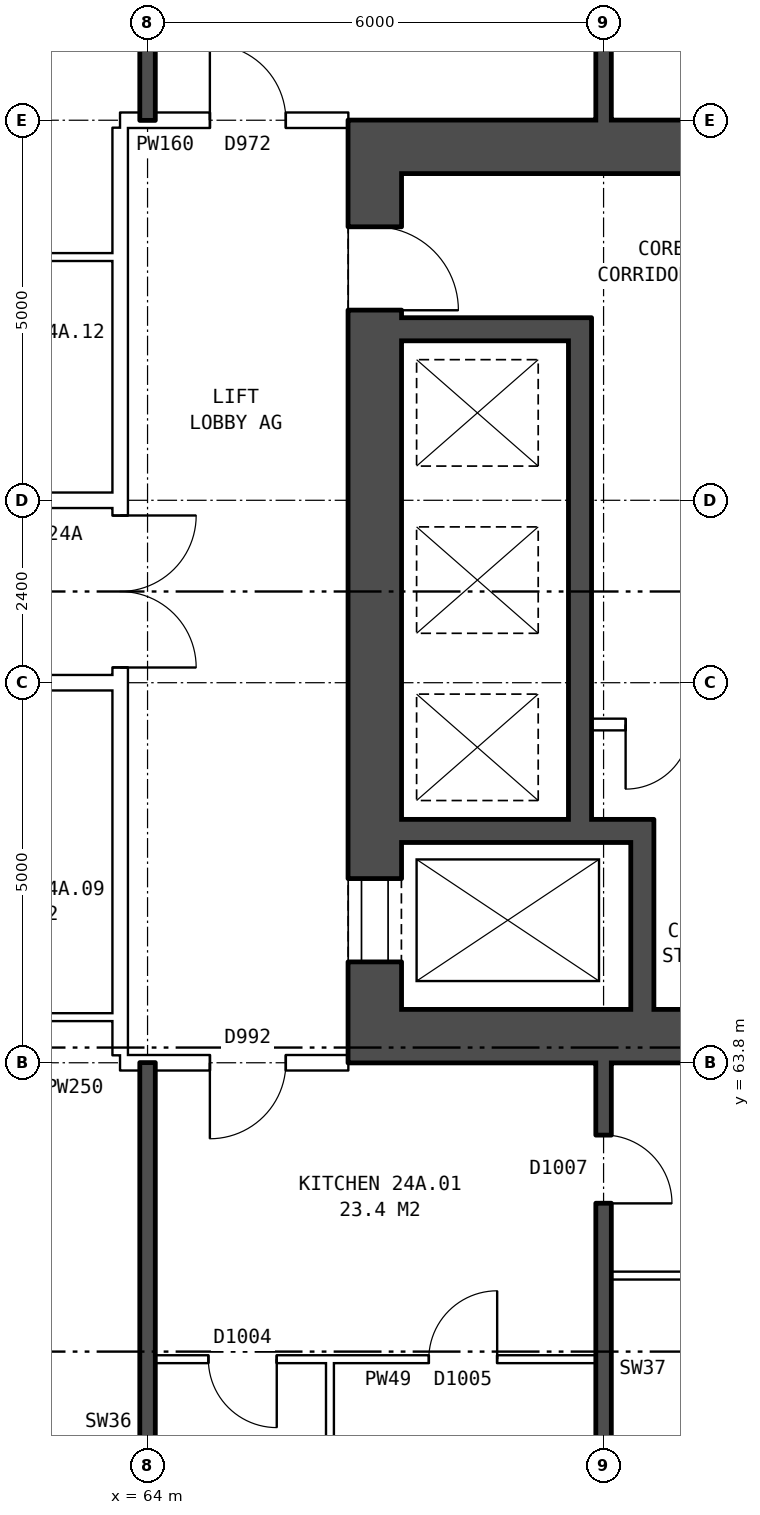
"""IFC4 building model, lengths in metres.
Left out: names, types, materials, properties, quantities, classifications, styles, units other than length and angle.
Written with IfcOpenShell. Run it as: python <this file> out.ifc"""

import sys

from ifc_helpers import new_model, si_unit, direction, frame, frame_2d, origin, place, context, subcontext, project, spatial, rectangle, extrude, element, fill, save


model = new_model("IFC4")
c1 = context("Model", 3, precision=1e-05, world=origin(), true_north=direction((0.0, 1.0)))
c2 = subcontext(c1, "Body", "Model", "MODEL_VIEW")
j1 = project(units=[si_unit("LENGTHUNIT", "METRE"), si_unit("PLANEANGLEUNIT", "RADIAN")], contexts=[c1])
p1 = place(None, origin())
s1 = spatial("IfcSite", under=j1, at=p1, CompositionType="ELEMENT")
p2 = place(p1, origin())
s2 = spatial("IfcBuilding", under=s1, at=p2, CompositionType="ELEMENT")
p3 = place(p2, frame((0.0, 0.0, 87.1)))
s3 = spatial("IfcBuildingStorey", under=s2, at=p3, CompositionType="ELEMENT", Elevation=87.1)
p4 = place(p3, frame((66.99, 64.5, 0.0), z_axis=(0.0, 0.0, 1.0), x_axis=(0.0, 1.0, 0.0)))
e1 = element("IfcWall", 1, at=p4, inside=s3, PredefinedType="SHEAR", context=c2, shape_type="SweptSolid", body=[
    extrude(rectangle(XDim=11.0, YDim=0.7, at=frame_2d((5.5, 0.0))), origin(), (0.0, 0.0, 1.0), 2.85),
])
p5 = place(p4, frame((0.625, 0.0, 0.0)))
e2 = element("IfcOpeningElement", 2, at=p5, cuts=e1, PredefinedType="OPENING", context=c2, shape_type="SweptSolid", body=[
    extrude(rectangle(XDim=1.1, YDim=2.1, at=frame_2d((0.55, 1.05))), frame((0.0, 0.36, 0.0), z_axis=(0.0, -1.0, 0.0), x_axis=(1.0, 0.0, 0.0)), (0.0, 0.0, 1.0), 0.72),
])
p6 = place(p4, frame((9.2, 0.0, 0.0)))
e3 = element("IfcOpeningElement", 3, at=p6, cuts=e1, PredefinedType="OPENING", context=c2, shape_type="SweptSolid", body=[
    extrude(rectangle(XDim=1.1, YDim=2.1, at=frame_2d((0.55, 1.05))), frame((0.0, 0.36, 0.0), z_axis=(0.0, -1.0, 0.0), x_axis=(1.0, 0.0, 0.0)), (0.0, 0.0, 1.0), 0.72),
])
for number, where, z_axis, x_axis in (
    (4, (66.64, 64.15, 0.0), (0.0, 0.0, 1.0), (1.0, 0.0, 0.0)),
    (5, (66.64, 75.85, 0.0), (0.0, 0.0, 1.0), (1.0, 0.0, 0.0)),
):
    element("IfcWall", number, at=place(p3, frame(where, z_axis=z_axis, x_axis=x_axis)), inside=s3, PredefinedType="SHEAR", context=c2, shape_type="SweptSolid", body=[
        extrude(rectangle(XDim=9.0, YDim=0.7, at=frame_2d((4.5, 0.0))), origin(), (0.0, 0.0, 1.0), 2.85),
    ])
p7 = place(p3, frame((67.34, 66.85, 0.0), z_axis=(0.0, 0.0, 1.0), x_axis=(1.0, 0.0, 0.0)))
e6 = element("IfcWall", 6, at=p7, inside=s3, PredefinedType="SHEAR", context=c2, shape_type="SweptSolid", body=[
    extrude(rectangle(XDim=3.32, YDim=0.3, at=frame_2d((1.66, 0.0))), origin(), (0.0, 0.0, 1.0), 2.85),
])
p8 = place(p3, frame((69.84, 68.25, 0.0), z_axis=(0.0, 0.0, 1.0), x_axis=(1.0, 0.0, 0.0)))
e7 = element("IfcWall", 7, at=p8, inside=s3, PredefinedType="PARTITIONING", context=c2, shape_type="SweptSolid", body=[
    extrude(rectangle(XDim=1.75, YDim=0.15, at=frame_2d((0.875, 0.0))), origin(), (0.0, 0.0, 1.0), 2.85),
])
p9 = place(p8, frame((0.45, 0.0, 0.0)))
e8 = element("IfcOpeningElement", 8, at=p9, cuts=e7, PredefinedType="OPENING", context=c2, shape_type="SweptSolid", body=[
    extrude(rectangle(XDim=0.85, YDim=2.1, at=frame_2d((0.425, 1.05))), frame((0.0, 0.085, 0.0), z_axis=(0.0, -1.0, 0.0), x_axis=(1.0, 0.0, 0.0)), (0.0, 0.0, 1.0), 0.17),
])
p10 = place(p3, frame((67.34, 73.45, 0.0), z_axis=(0.0, 0.0, 1.0), x_axis=(1.0, 0.0, 0.0)))
e9 = element("IfcWall", 9, at=p10, inside=s3, PredefinedType="SHEAR", context=c2, shape_type="SweptSolid", body=[
    extrude(rectangle(XDim=2.2, YDim=0.3, at=frame_2d((1.1, 0.0))), origin(), (0.0, 0.0, 1.0), 2.85),
])
p11 = place(p3, frame((69.69, 67.0, 0.0), z_axis=(0.0, 0.0, 1.0), x_axis=(0.0, 1.0, 0.0)))
e10 = element("IfcWall", 10, at=p11, inside=s3, PredefinedType="SHEAR", context=c2, shape_type="SweptSolid", body=[
    extrude(rectangle(XDim=6.6, YDim=0.3, at=frame_2d((3.3, 0.0))), origin(), (0.0, 0.0, 1.0), 2.85),
])
p12 = place(p3, frame((70.51, 64.5, 0.0), z_axis=(0.0, 0.0, 1.0), x_axis=(0.0, 1.0, 0.0)))
e11 = element("IfcWall", 11, at=p12, inside=s3, PredefinedType="SHEAR", context=c2, shape_type="SweptSolid", body=[
    extrude(rectangle(XDim=2.2, YDim=0.3, at=frame_2d((1.1, 0.0))), origin(), (0.0, 0.0, 1.0), 2.85),
])
p13 = place(p3, frame((63.64, 63.9, 0.0), z_axis=(0.0, 0.0, 1.0), x_axis=(0.0, 1.0, 0.0)))
e12 = element("IfcWall", 12, at=p13, inside=s3, PredefinedType="PARTITIONING", context=c2, shape_type="SweptSolid", body=[
    extrude(rectangle(XDim=12.2, YDim=0.2, at=frame_2d((6.1, 0.0))), origin(), (0.0, 0.0, 1.0), 2.85),
])
p14 = place(p13, frame((5.1, 0.0, 0.0)))
e13 = element("IfcOpeningElement", 13, at=p14, cuts=e12, PredefinedType="OPENING", context=c2, shape_type="SweptSolid", body=[
    extrude(rectangle(XDim=2.0, YDim=2.1, at=frame_2d((1.0, 1.05))), frame((0.0, 0.11, 0.0), z_axis=(0.0, -1.0, 0.0), x_axis=(1.0, 0.0, 0.0)), (0.0, 0.0, 1.0), 0.22),
])
p15 = place(p3, frame((64.1, 59.9, 0.0), z_axis=(0.0, 0.0, 1.0), x_axis=(1.0, 0.0, 0.0)))
e14 = element("IfcWall", 14, at=p15, inside=s3, PredefinedType="PARTITIONING", context=c2, shape_type="SweptSolid", body=[
    extrude(rectangle(XDim=5.8, YDim=0.1, at=frame_2d((2.9, 0.0))), origin(), (0.0, 0.0, 1.0), 2.85),
])
p16 = place(p15, frame((3.6, 0.0, 0.0)))
e15 = element("IfcOpeningElement", 15, at=p16, cuts=e14, PredefinedType="OPENING", context=c2, shape_type="SweptSolid", body=[
    extrude(rectangle(XDim=0.9, YDim=2.1, at=frame_2d((0.45, 1.05))), frame((0.0, 0.06, 0.0), z_axis=(0.0, -1.0, 0.0), x_axis=(1.0, 0.0, 0.0)), (0.0, 0.0, 1.0), 0.12),
])
p17 = place(p15, frame((0.7, 0.0, 0.0)))
e16 = element("IfcOpeningElement", 16, at=p17, cuts=e14, PredefinedType="OPENING", context=c2, shape_type="SweptSolid", body=[
    extrude(rectangle(XDim=0.9, YDim=2.1, at=frame_2d((0.45, 1.05))), frame((0.0, 0.06, 0.0), z_axis=(0.0, -1.0, 0.0), x_axis=(1.0, 0.0, 0.0)), (0.0, 0.0, 1.0), 0.12),
])
p18 = place(p3, frame((70.1, 61.0, 0.0), z_axis=(0.0, 0.0, 1.0), x_axis=(1.0, 0.0, 0.0)))
e17 = element("IfcWall", 17, at=p18, inside=s3, PredefinedType="PARTITIONING", context=c2, shape_type="SweptSolid", body=[
    extrude(rectangle(XDim=5.54, YDim=0.1, at=frame_2d((2.77, 0.0))), origin(), (0.0, 0.0, 1.0), 2.85),
])
p19 = place(p3, frame((63.64, 63.8, 0.0), z_axis=(0.0, 0.0, 1.0), x_axis=(1.0, 0.0, 0.0)))
e18 = element("IfcWall", 18, at=p19, inside=s3, PredefinedType="PARTITIONING", context=c2, shape_type="SweptSolid", body=[
    extrude(rectangle(XDim=3.0, YDim=0.2, at=frame_2d((1.5, 0.0))), origin(), (0.0, 0.0, 1.0), 2.85),
])
p20 = place(p19, frame((1.18, 0.0, 0.0)))
e19 = element("IfcOpeningElement", 19, at=p20, cuts=e18, PredefinedType="OPENING", context=c2, shape_type="SweptSolid", body=[
    extrude(rectangle(XDim=1.0, YDim=2.1, at=frame_2d((0.5, 1.05))), frame((0.0, 0.11, 0.0), z_axis=(0.0, -1.0, 0.0), x_axis=(1.0, 0.0, 0.0)), (0.0, 0.0, 1.0), 0.22),
])
p21 = place(p3, frame((61.0, 64.4, 0.0), z_axis=(0.0, 0.0, 1.0), x_axis=(1.0, 0.0, 0.0)))
e20 = element("IfcWall", 20, at=p21, inside=s3, PredefinedType="PARTITIONING", context=c2, shape_type="SweptSolid", body=[
    extrude(rectangle(XDim=2.64, YDim=0.1, at=frame_2d((1.32, 0.0))), origin(), (0.0, 0.0, 1.0), 2.85),
])
p22 = place(p3, frame((44.36, 68.8, 0.0), z_axis=(0.0, 0.0, 1.0), x_axis=(1.0, 0.0, 0.0)))
e21 = element("IfcWall", 21, at=p22, inside=s3, PredefinedType="PARTITIONING", context=c2, shape_type="SweptSolid", body=[
    extrude(rectangle(XDim=19.28, YDim=0.2, at=frame_2d((9.64, 0.0))), origin(), (0.0, 0.0, 1.0), 2.85),
])
p23 = place(p22, frame((14.64, 0.0, 0.0)))
e22 = element("IfcOpeningElement", 22, at=p23, cuts=e21, PredefinedType="OPENING", context=c2, shape_type="SweptSolid", body=[
    extrude(rectangle(XDim=1.0, YDim=2.1, at=frame_2d((0.5, 1.05))), frame((0.0, 0.11, 0.0), z_axis=(0.0, -1.0, 0.0), x_axis=(1.0, 0.0, 0.0)), (0.0, 0.0, 1.0), 0.22),
])
p24 = place(p22, frame((11.64, 0.0, 0.0)))
e23 = element("IfcOpeningElement", 23, at=p24, cuts=e21, PredefinedType="OPENING", context=c2, shape_type="SweptSolid", body=[
    extrude(rectangle(XDim=1.0, YDim=2.1, at=frame_2d((0.5, 1.05))), frame((0.0, 0.11, 0.0), z_axis=(0.0, -1.0, 0.0), x_axis=(1.0, 0.0, 0.0)), (0.0, 0.0, 1.0), 0.22),
])
p25 = place(p22, frame((2.64, 0.0, 0.0)))
e24 = element("IfcOpeningElement", 24, at=p25, cuts=e21, PredefinedType="OPENING", context=c2, shape_type="SweptSolid", body=[
    extrude(rectangle(XDim=1.0, YDim=2.1, at=frame_2d((0.5, 1.05))), frame((0.0, 0.11, 0.0), z_axis=(0.0, -1.0, 0.0), x_axis=(1.0, 0.0, 0.0)), (0.0, 0.0, 1.0), 0.22),
])
p26 = place(p3, frame((44.36, 71.2, 0.0), z_axis=(0.0, 0.0, 1.0), x_axis=(1.0, 0.0, 0.0)))
e25 = element("IfcWall", 25, at=p26, inside=s3, PredefinedType="PARTITIONING", context=c2, shape_type="SweptSolid", body=[
    extrude(rectangle(XDim=19.28, YDim=0.2, at=frame_2d((9.64, 0.0))), origin(), (0.0, 0.0, 1.0), 2.85),
])
p27 = place(p26, frame((14.64, 0.0, 0.0)))
e26 = element("IfcOpeningElement", 26, at=p27, cuts=e25, PredefinedType="OPENING", context=c2, shape_type="SweptSolid", body=[
    extrude(rectangle(XDim=1.0, YDim=2.1, at=frame_2d((0.5, 1.05))), frame((0.0, 0.11, 0.0), z_axis=(0.0, -1.0, 0.0), x_axis=(1.0, 0.0, 0.0)), (0.0, 0.0, 1.0), 0.22),
])
p28 = place(p26, frame((8.64, 0.0, 0.0)))
e27 = element("IfcOpeningElement", 27, at=p28, cuts=e25, PredefinedType="OPENING", context=c2, shape_type="SweptSolid", body=[
    extrude(rectangle(XDim=1.0, YDim=2.1, at=frame_2d((0.5, 1.05))), frame((0.0, 0.11, 0.0), z_axis=(0.0, -1.0, 0.0), x_axis=(1.0, 0.0, 0.0)), (0.0, 0.0, 1.0), 0.22),
])
p29 = place(p26, frame((2.64, 0.0, 0.0)))
e28 = element("IfcOpeningElement", 28, at=p29, cuts=e25, PredefinedType="OPENING", context=c2, shape_type="SweptSolid", body=[
    extrude(rectangle(XDim=1.0, YDim=2.1, at=frame_2d((0.5, 1.05))), frame((0.0, 0.11, 0.0), z_axis=(0.0, -1.0, 0.0), x_axis=(1.0, 0.0, 0.0)), (0.0, 0.0, 1.0), 0.22),
])
p30 = place(p3, frame((61.0, 74.4, 0.0), z_axis=(0.0, 0.0, 1.0), x_axis=(1.0, 0.0, 0.0)))
e29 = element("IfcWall", 29, at=p30, inside=s3, PredefinedType="PARTITIONING", context=c2, shape_type="SweptSolid", body=[
    extrude(rectangle(XDim=2.64, YDim=0.1, at=frame_2d((1.32, 0.0))), origin(), (0.0, 0.0, 1.0), 2.85),
])
p31 = place(p3, frame((63.64, 76.2, 0.0), z_axis=(0.0, 0.0, 1.0), x_axis=(1.0, 0.0, 0.0)))
e30 = element("IfcWall", 30, at=p31, inside=s3, PredefinedType="PARTITIONING", context=c2, shape_type="SweptSolid", body=[
    extrude(rectangle(XDim=3.0, YDim=0.2, at=frame_2d((1.5, 0.0))), origin(), (0.0, 0.0, 1.0), 2.85),
])
p32 = place(p31, frame((1.18, 0.0, 0.0)))
e31 = element("IfcOpeningElement", 31, at=p32, cuts=e30, PredefinedType="OPENING", context=c2, shape_type="SweptSolid", body=[
    extrude(rectangle(XDim=1.0, YDim=2.1, at=frame_2d((0.5, 1.05))), frame((0.0, 0.11, 0.0), z_axis=(0.0, -1.0, 0.0), x_axis=(1.0, 0.0, 0.0)), (0.0, 0.0, 1.0), 0.22),
])
for number, where, z_axis, x_axis in (
    (32, (64.0, 54.36, 0.0), (0.0, 0.0, 1.0), (0.0, 1.0, 0.0)),
    (33, (64.0, 76.2, 0.0), (0.0, 0.0, 1.0), (0.0, 1.0, 0.0)),
):
    element("IfcWall", number, at=place(p3, frame(where, z_axis=z_axis, x_axis=x_axis)), inside=s3, PredefinedType="SOLIDWALL", context=c2, shape_type="SweptSolid", body=[
        extrude(rectangle(XDim=9.44, YDim=0.2, at=frame_2d((4.72, 0.0))), origin(), (0.0, 0.0, 1.0), 2.85),
    ])
p33 = place(p3, frame((66.4, 57.45, 0.0), z_axis=(0.0, 0.0, 1.0), x_axis=(0.0, 1.0, 0.0)))
e34 = element("IfcWall", 34, at=p33, inside=s3, PredefinedType="PARTITIONING", context=c2, shape_type="SweptSolid", body=[
    extrude(rectangle(XDim=2.4, YDim=0.1, at=frame_2d((1.2, 0.0))), origin(), (0.0, 0.0, 1.0), 2.85),
])
p34 = place(p3, frame((70.0, 54.36, 0.0), z_axis=(0.0, 0.0, 1.0), x_axis=(0.0, 1.0, 0.0)))
e35 = element("IfcWall", 35, at=p34, inside=s3, PredefinedType="SOLIDWALL", context=c2, shape_type="SweptSolid", body=[
    extrude(rectangle(XDim=9.44, YDim=0.2, at=frame_2d((4.72, 0.0))), origin(), (0.0, 0.0, 1.0), 2.85),
])
p35 = place(p34, frame((2.32, 0.0, 0.0)))
e36 = element("IfcOpeningElement", 36, at=p35, cuts=e35, PredefinedType="OPENING", context=c2, shape_type="SweptSolid", body=[
    extrude(rectangle(XDim=0.9, YDim=2.1, at=frame_2d((0.45, 1.05))), frame((0.0, 0.11, 0.0), z_axis=(0.0, -1.0, 0.0), x_axis=(1.0, 0.0, 0.0)), (0.0, 0.0, 1.0), 0.22),
])
p36 = place(p34, frame((7.59, 0.0, 0.0)))
e37 = element("IfcOpeningElement", 37, at=p36, cuts=e35, PredefinedType="OPENING", context=c2, shape_type="SweptSolid", body=[
    extrude(rectangle(XDim=0.9, YDim=2.1, at=frame_2d((0.45, 1.05))), frame((0.0, 0.11, 0.0), z_axis=(0.0, -1.0, 0.0), x_axis=(1.0, 0.0, 0.0)), (0.0, 0.0, 1.0), 0.22),
])
p37 = place(p3, frame((70.0, 76.2, 0.0), z_axis=(0.0, 0.0, 1.0), x_axis=(0.0, 1.0, 0.0)))
e38 = element("IfcWall", 38, at=p37, inside=s3, PredefinedType="SOLIDWALL", context=c2, shape_type="SweptSolid", body=[
    extrude(rectangle(XDim=9.44, YDim=0.2, at=frame_2d((4.72, 0.0))), origin(), (0.0, 0.0, 1.0), 2.85),
])
p38 = place(p37, frame((6.07, 0.0, 0.0)))
e39 = element("IfcOpeningElement", 39, at=p38, cuts=e38, PredefinedType="OPENING", context=c2, shape_type="SweptSolid", body=[
    extrude(rectangle(XDim=0.9, YDim=2.1, at=frame_2d((0.45, 1.05))), frame((0.0, 0.11, 0.0), z_axis=(0.0, -1.0, 0.0), x_axis=(1.0, 0.0, 0.0)), (0.0, 0.0, 1.0), 0.22),
])
p39 = place(p37, frame((0.95, 0.0, 0.0)))
e40 = element("IfcOpeningElement", 40, at=p39, cuts=e38, PredefinedType="OPENING", context=c2, shape_type="SweptSolid", body=[
    extrude(rectangle(XDim=0.9, YDim=2.1, at=frame_2d((0.45, 1.05))), frame((0.0, 0.11, 0.0), z_axis=(0.0, -1.0, 0.0), x_axis=(1.0, 0.0, 0.0)), (0.0, 0.0, 1.0), 0.22),
])
p40 = place(p5, origin())
e41 = element("IfcDoor", 41, at=p40, inside=s3, OperationType="DOUBLE_DOOR_SLIDING", PredefinedType="DOOR", context=c2, shape_type="SweptSolid", body=[
    extrude(rectangle(XDim=1.1, YDim=2.1, at=frame_2d((0.55, 1.05))), frame((0.0, -0.285, 0.0), z_axis=(0.0, -1.0, 0.0), x_axis=(1.0, 0.0, 0.0)), (0.0, 0.0, 1.0), 0.05),
])
fill(e2, e41)
p41 = place(p6, frame((1.1, 0.0, 0.0), z_axis=(0.0, 0.0, 1.0), x_axis=(-1.0, 0.0, 0.0)))
e42 = element("IfcDoor", 42, at=p41, inside=s3, OperationType="SINGLE_SWING_RIGHT", PredefinedType="DOOR", context=c2, shape_type="SweptSolid", body=[
    extrude(rectangle(XDim=1.1, YDim=2.1, at=frame_2d((0.55, 1.05))), frame((0.0, 0.335, 0.0), z_axis=(0.0, -1.0, 0.0), x_axis=(1.0, 0.0, 0.0)), (0.0, 0.0, 1.0), 0.05),
])
fill(e3, e42)
p42 = place(p9, frame((0.85, 0.0, 0.0), z_axis=(0.0, 0.0, 1.0), x_axis=(-1.0, 0.0, 0.0)))
e43 = element("IfcDoor", 43, at=p42, inside=s3, OperationType="SINGLE_SWING_RIGHT", PredefinedType="DOOR", context=c2, shape_type="SweptSolid", body=[
    extrude(rectangle(XDim=0.85, YDim=2.1, at=frame_2d((0.425, 1.05))), frame((0.0, 0.025, 0.0), z_axis=(0.0, -1.0, 0.0), x_axis=(1.0, 0.0, 0.0)), (0.0, 0.0, 1.0), 0.05),
])
fill(e8, e43)
p43 = place(p14, frame((2.0, 0.0, 0.0), z_axis=(0.0, 0.0, 1.0), x_axis=(-1.0, 0.0, 0.0)))
e44 = element("IfcDoor", 44, at=p43, inside=s3, OperationType="DOUBLE_DOOR_SINGLE_SWING", PredefinedType="DOOR", context=c2, shape_type="SweptSolid", body=[
    extrude(rectangle(XDim=2.0, YDim=2.1, at=frame_2d((1.0, 1.05))), frame((0.0, 0.025, 0.0), z_axis=(0.0, -1.0, 0.0), x_axis=(1.0, 0.0, 0.0)), (0.0, 0.0, 1.0), 0.05),
])
fill(e13, e44)
p44 = place(p36, frame((0.9, 0.0, 0.0), z_axis=(0.0, 0.0, 1.0), x_axis=(-1.0, 0.0, 0.0)))
e45 = element("IfcDoor", 45, at=p44, inside=s3, OperationType="SINGLE_SWING_RIGHT", PredefinedType="DOOR", context=c2, shape_type="SweptSolid", body=[
    extrude(rectangle(XDim=0.9, YDim=2.1, at=frame_2d((0.45, 1.05))), frame((0.0, 0.025, 0.0), z_axis=(0.0, -1.0, 0.0), x_axis=(1.0, 0.0, 0.0)), (0.0, 0.0, 1.0), 0.05),
])
fill(e37, e45)
p45 = place(p20, frame((1.0, 0.0, 0.0), z_axis=(0.0, 0.0, 1.0), x_axis=(-1.0, 0.0, 0.0)))
e46 = element("IfcDoor", 46, at=p45, inside=s3, OperationType="SINGLE_SWING_RIGHT", PredefinedType="DOOR", context=c2, shape_type="SweptSolid", body=[
    extrude(rectangle(XDim=1.0, YDim=2.1, at=frame_2d((0.5, 1.05))), frame((0.0, 0.025, 0.0), z_axis=(0.0, -1.0, 0.0), x_axis=(1.0, 0.0, 0.0)), (0.0, 0.0, 1.0), 0.05),
])
fill(e19, e46)
p46 = place(p16, origin())
e47 = element("IfcDoor", 47, at=p46, inside=s3, OperationType="SINGLE_SWING_RIGHT", PredefinedType="DOOR", context=c2, shape_type="SweptSolid", body=[
    extrude(rectangle(XDim=0.9, YDim=2.1, at=frame_2d((0.45, 1.05))), frame((0.0, 0.025, 0.0), z_axis=(0.0, -1.0, 0.0), x_axis=(1.0, 0.0, 0.0)), (0.0, 0.0, 1.0), 0.05),
])
fill(e15, e47)
p47 = place(p17, frame((0.9, 0.0, 0.0), z_axis=(0.0, 0.0, 1.0), x_axis=(-1.0, 0.0, 0.0)))
e48 = element("IfcDoor", 48, at=p47, inside=s3, OperationType="SINGLE_SWING_LEFT", PredefinedType="DOOR", context=c2, shape_type="SweptSolid", body=[
    extrude(rectangle(XDim=0.9, YDim=2.1, at=frame_2d((0.45, 1.05))), frame((0.0, 0.025, 0.0), z_axis=(0.0, -1.0, 0.0), x_axis=(1.0, 0.0, 0.0)), (0.0, 0.0, 1.0), 0.05),
])
fill(e16, e48)
p48 = place(p32, origin())
e49 = element("IfcDoor", 49, at=p48, inside=s3, OperationType="SINGLE_SWING_LEFT", PredefinedType="DOOR", context=c2, shape_type="SweptSolid", body=[
    extrude(rectangle(XDim=1.0, YDim=2.1, at=frame_2d((0.5, 1.05))), frame((0.0, 0.025, 0.0), z_axis=(0.0, -1.0, 0.0), x_axis=(1.0, 0.0, 0.0)), (0.0, 0.0, 1.0), 0.05),
])
fill(e31, e49)
save(model, sys.argv[1])
